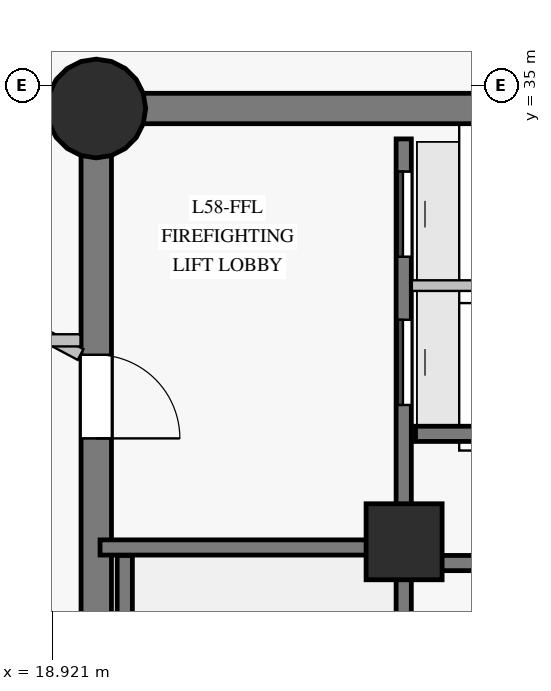
"""IFC4 building model, lengths in metres.
Left out: names, types, materials, properties, quantities, classifications, styles, units other than length and angle.
Written with IfcOpenShell. Run it as: python <this file> out.ifc"""

import sys

from ifc_helpers import new_model, si_unit, direction, frame, frame_2d, origin, origin_with_axes, origin_2d, place, context, subcontext, project, spatial, rectangle, circle, extrude, source, transform, mapped, element, fill, save


model = new_model("IFC4")
c1 = context("Model", 3, precision=1e-05, world=origin(), true_north=direction((0.0, 1.0)))
c2 = subcontext(c1, "Body", "Model", "MODEL_VIEW")
j1 = project(units=[si_unit("LENGTHUNIT", "METRE"), si_unit("PLANEANGLEUNIT", "RADIAN")], contexts=[c1])
p1 = place(None, origin())
s1 = spatial("IfcSite", under=j1, at=p1, CompositionType="ELEMENT")
p2 = place(p1, origin())
s2 = spatial("IfcBuilding", under=s1, at=p2, CompositionType="ELEMENT")
p3 = place(p2, frame((0.0, 0.0, 199.25)))
s3 = spatial("IfcBuildingStorey", under=s2, at=p3, CompositionType="ELEMENT", Elevation=199.25)
p4 = place(p3, frame((26.55, 34.7, 0.0), z_axis=(0.0, 0.0, 1.0), x_axis=(-1.0, 0.0, 0.0)))
e1 = element("IfcWall", 1, at=p4, inside=s3, PredefinedType="SHEAR", context=c2, shape_type="SweptSolid", body=[
    extrude(rectangle(XDim=7.05, YDim=0.4, at=frame_2d((3.525, 0.0))), origin(), (0.0, 0.0, 1.0), 2.825),
])
p5 = place(p3, frame((19.5, 34.7, 0.0), z_axis=(0.0, 0.0, 1.0), x_axis=(0.0, -1.0, 0.0)))
e2 = element("IfcWall", 2, at=p5, inside=s3, PredefinedType="SHEAR", context=c2, shape_type="SweptSolid", body=[
    extrude(rectangle(XDim=16.4, YDim=0.4, at=frame_2d((8.2, 0.0))), origin(), (0.0, 0.0, 1.0), 2.825),
])
p6 = place(p5, frame((3.24, 0.0, 0.0)))
e3 = element("IfcOpeningElement", 3, at=p6, cuts=e2, PredefinedType="OPENING", context=c2, shape_type="SweptSolid", body=[
    extrude(rectangle(XDim=1.1, YDim=2.15, at=frame_2d((0.55, 1.075))), frame((0.0, 0.21, 0.0), z_axis=(0.0, -1.0, 0.0), x_axis=(1.0, 0.0, 0.0)), (0.0, 0.0, 1.0), 0.42),
])
m1 = source(origin_with_axes(), c2, "Body", "SweptSolid", [
    extrude(circle(Radius=0.65, at=origin_2d()), origin(), (0.0, 0.0, 1.0), 3.05),
])
p7 = place(p3, frame((19.5, 34.7, 0.0), z_axis=(0.0, 0.0, 1.0), x_axis=(1.0, 0.0, 0.0)))
e4 = element("IfcColumn", 4, at=p7, inside=s3, PredefinedType="COLUMN", context=c2, shape_type="MappedRepresentation", body=[
    mapped(m1, transform((0.0, 0.0, 0.0), scale=1.0)),
])
m2 = source(origin_with_axes(), c2, "Body", "SweptSolid", [
    extrude(rectangle(XDim=1.0, YDim=1.0, at=origin_2d()), origin(), (0.0, 0.0, 1.0), 3.05),
])
p8 = place(p3, frame((23.55, 29.0, 0.0), z_axis=(0.0, 0.0, 1.0), x_axis=(1.0, 0.0, 0.0)))
e5 = element("IfcColumn", 5, at=p8, inside=s3, PredefinedType="COLUMN", context=c2, shape_type="MappedRepresentation", body=[
    mapped(m2, transform((0.0, 0.0, 0.0), scale=1.0)),
])
p9 = place(p3, frame((23.545, 18.7, 0.0), z_axis=(0.0, 0.0, 1.0), x_axis=(0.0, 1.0, 0.0)))
e6 = element("IfcWall", 6, at=p9, inside=s3, PredefinedType="SHEAR", context=c2, shape_type="SweptSolid", body=[
    extrude(rectangle(XDim=15.6, YDim=0.2, at=frame_2d((7.8, 0.0))), origin(), (0.0, 0.0, 1.0), 2.825),
])
p10 = place(p9, frame((2.75, 0.0, 0.0)))
e7 = element("IfcOpeningElement", 7, at=p10, cuts=e6, PredefinedType="OPENING", context=c2, shape_type="SweptSolid", body=[
    extrude(rectangle(XDim=1.15, YDim=2.15, at=frame_2d((0.575, 1.075))), frame((0.0, 0.11, 0.0), z_axis=(0.0, -1.0, 0.0), x_axis=(1.0, 0.0, 0.0)), (0.0, 0.0, 1.0), 0.22),
])
p11 = place(p9, frame((0.14, 0.0, 0.0)))
e8 = element("IfcOpeningElement", 8, at=p11, cuts=e6, PredefinedType="OPENING", context=c2, shape_type="SweptSolid", body=[
    extrude(rectangle(XDim=0.88, YDim=2.1, at=frame_2d((0.44, 1.05))), frame((0.0, 0.11, 0.0), z_axis=(0.0, -1.0, 0.0), x_axis=(1.0, 0.0, 0.0)), (0.0, 0.0, 1.0), 0.22),
])
p12 = place(p9, frame((1.36, 0.0, 0.0)))
e9 = element("IfcOpeningElement", 9, at=p12, cuts=e6, PredefinedType="OPENING", context=c2, shape_type="SweptSolid", body=[
    extrude(rectangle(XDim=0.88, YDim=2.1, at=frame_2d((0.44, 1.05))), frame((0.0, 0.11, 0.0), z_axis=(0.0, -1.0, 0.0), x_axis=(1.0, 0.0, 0.0)), (0.0, 0.0, 1.0), 0.22),
])
p13 = place(p9, frame((12.1, 0.0, 0.0)))
e10 = element("IfcOpeningElement", 10, at=p13, cuts=e6, PredefinedType="OPENING", context=c2, shape_type="SweptSolid", body=[
    extrude(rectangle(XDim=1.12, YDim=2.15, at=frame_2d((0.56, 1.075))), frame((0.0, 0.11, 0.0), z_axis=(0.0, -1.0, 0.0), x_axis=(1.0, 0.0, 0.0)), (0.0, 0.0, 1.0), 0.22),
])
p14 = place(p9, frame((14.05, 0.0, 0.0)))
e11 = element("IfcOpeningElement", 11, at=p14, cuts=e6, PredefinedType="OPENING", context=c2, shape_type="SweptSolid", body=[
    extrude(rectangle(XDim=1.12, YDim=2.15, at=frame_2d((0.56, 1.075))), frame((0.0, 0.11, 0.0), z_axis=(0.0, -1.0, 0.0), x_axis=(1.0, 0.0, 0.0)), (0.0, 0.0, 1.0), 0.22),
])
p15 = place(p3, frame((23.7, 28.72, 0.0), z_axis=(0.0, 0.0, 1.0), x_axis=(1.0, 0.0, 0.0)))
e12 = element("IfcWall", 12, at=p15, inside=s3, PredefinedType="SHEAR", context=c2, shape_type="SweptSolid", body=[
    extrude(rectangle(XDim=9.6, YDim=0.2, at=frame_2d((4.8, 0.0))), origin(), (0.0, 0.0, 1.0), 2.825),
])
p16 = place(p15, frame((1.1, 0.0, 0.0)))
e13 = element("IfcOpeningElement", 13, at=p16, cuts=e12, PredefinedType="OPENING", context=c2, shape_type="SweptSolid", body=[
    extrude(rectangle(XDim=0.92, YDim=2.1, at=frame_2d((0.46, 1.05))), frame((0.0, 0.11, 0.0), z_axis=(0.0, -1.0, 0.0), x_axis=(1.0, 0.0, 0.0)), (0.0, 0.0, 1.0), 0.22),
])
p17 = place(p15, frame((5.2, 0.0, 0.0)))
e14 = element("IfcOpeningElement", 14, at=p17, cuts=e12, PredefinedType="OPENING", context=c2, shape_type="SweptSolid", body=[
    extrude(rectangle(XDim=1.0, YDim=2.15, at=frame_2d((0.5, 1.075))), frame((0.0, 0.11, 0.0), z_axis=(0.0, -1.0, 0.0), x_axis=(1.0, 0.0, 0.0)), (0.0, 0.0, 1.0), 0.22),
])
p18 = place(p3, frame((19.875, 21.32, 0.0), z_axis=(0.0, 0.0, 1.0), x_axis=(0.0, 1.0, 0.0)))
e15 = element("IfcWall", 15, at=p18, inside=s3, PredefinedType="SHEAR", context=c2, shape_type="SweptSolid", body=[
    extrude(rectangle(XDim=7.5, YDim=0.2, at=frame_2d((3.75, 0.0))), origin(), (0.0, 0.0, 1.0), 2.825),
])
p19 = place(p3, frame((19.55, 28.925, 0.0), z_axis=(0.0, 0.0, 1.0), x_axis=(1.0, 0.0, 0.0)))
e16 = element("IfcWall", 16, at=p19, inside=s3, PredefinedType="SHEAR", context=c2, shape_type="SweptSolid", body=[
    extrude(rectangle(XDim=3.995, YDim=0.2, at=frame_2d((1.998, 0.0))), origin(), (0.0, 0.0, 1.0), 2.825),
])
p20 = place(p3, frame((23.7, 30.42, 0.0), z_axis=(0.0, 0.0, 1.0), x_axis=(1.0, 0.0, 0.0)))
e17 = element("IfcWall", 17, at=p20, inside=s3, PredefinedType="SHEAR", context=c2, shape_type="SweptSolid", body=[
    extrude(rectangle(XDim=2.78, YDim=0.2, at=frame_2d((1.39, 0.0))), origin(), (0.0, 0.0, 1.0), 2.825),
])
p21 = place(p3, frame((19.294, 31.463, 0.0), z_axis=(0.0, 0.0, 1.0), x_axis=(-0.88295229879, 0.46946271211, 0.0)))
e18 = element("IfcWall", 18, at=p21, inside=s3, PredefinedType="PARTITIONING", context=c2, shape_type="SweptSolid", body=[
    extrude(rectangle(XDim=11.048, YDim=0.16, at=frame_2d((5.524, 0.0))), origin(), (0.0, 0.0, 1.0), 2.825),
])
p22 = place(p3, frame((23.652, 32.37, 0.0), z_axis=(0.0, 0.0, 1.0), x_axis=(1.0, 0.0, 0.0)))
e19 = element("IfcWall", 19, at=p22, inside=s3, PredefinedType="PARTITIONING", context=c2, shape_type="SweptSolid", body=[
    extrude(rectangle(XDim=2.828, YDim=0.14, at=frame_2d((1.414, 0.0))), origin(), (0.0, 0.0, 1.0), 2.825),
])
p23 = place(p3, frame((16.75, 31.65, 0.0), z_axis=(0.0, 0.0, 1.0), x_axis=(1.0, 0.0, 0.0)))
e20 = element("IfcWall", 20, at=p23, inside=s3, PredefinedType="PARTITIONING", context=c2, shape_type="SweptSolid", body=[
    extrude(rectangle(XDim=2.543, YDim=0.16, at=frame_2d((1.271, 0.0))), origin(), (0.0, 0.0, 1.0), 2.825),
])
m3 = source(origin_with_axes(), c2, "Body", "SweptSolid", [
    extrude(rectangle(XDim=1.1, YDim=2.15, at=frame_2d((0.55, 1.075))), frame((0.0, 0.025, 0.0), z_axis=(0.0, -1.0, 0.0), x_axis=(1.0, 0.0, 0.0)), (0.0, 0.0, 1.0), 0.05),
])
p24 = place(p6, origin())
e21 = element("IfcDoor", 21, at=p24, inside=s3, OperationType="SINGLE_SWING_RIGHT", PredefinedType="DOOR", context=c2, shape_type="MappedRepresentation", body=[
    mapped(m3, transform((0.0, 0.0, 0.0), scale=1.0)),
])
fill(e3, e21)
m4 = source(origin_with_axes(), c2, "Body", "SweptSolid", [
    extrude(rectangle(XDim=1.12, YDim=2.15, at=frame_2d((0.56, 1.075))), frame((0.0, 0.025, 0.0), z_axis=(0.0, -1.0, 0.0), x_axis=(1.0, 0.0, 0.0)), (0.0, 0.0, 1.0), 0.05),
])
p25 = place(p13, origin())
e22 = element("IfcDoor", 22, at=p25, inside=s3, OperationType="SLIDING_TO_LEFT", PredefinedType="DOOR", context=c2, shape_type="MappedRepresentation", body=[
    mapped(m4, transform((0.0, 0.0, 0.0), scale=1.0)),
])
fill(e10, e22)
p26 = place(p14, origin())
e23 = element("IfcDoor", 23, at=p26, inside=s3, OperationType="SLIDING_TO_RIGHT", PredefinedType="DOOR", context=c2, shape_type="MappedRepresentation", body=[
    mapped(m4, transform((0.0, 0.0, 0.0), scale=1.0)),
])
fill(e11, e23)
save(model, sys.argv[1])
